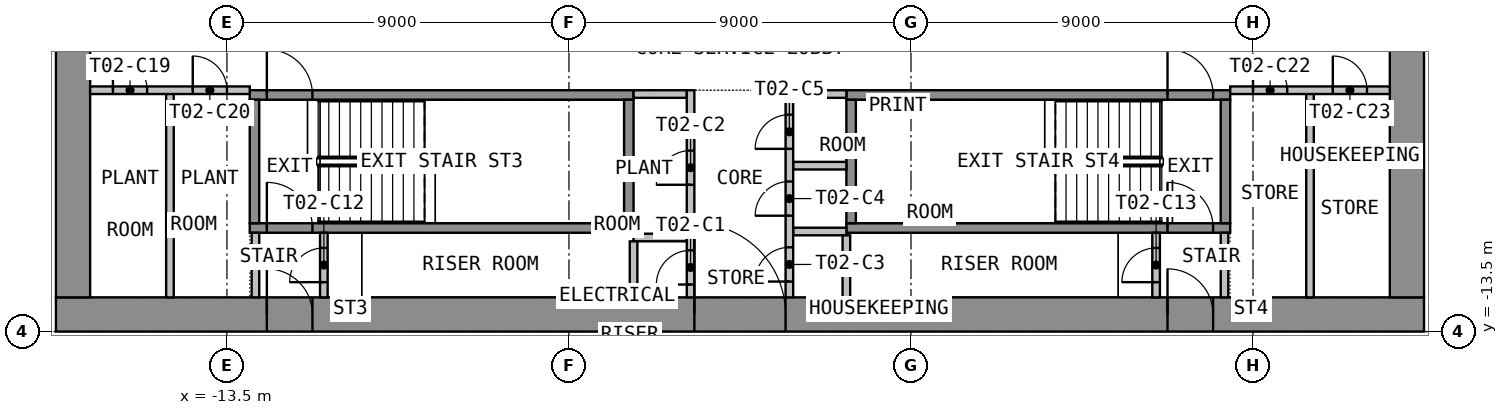
"""IFC4 building model, lengths in metres.
Left out: names, types, materials, properties, quantities, classifications, styles, units other than length and angle.
Written with IfcOpenShell. Run it as: python <this file> out.ifc"""

import sys

from ifc_helpers import new_model, si_unit, direction, frame, frame_2d, origin, place, context, subcontext, project, spatial, rectangle, extrude, element, fill, save


model = new_model("IFC4")
c1 = context("Model", 3, precision=1e-05, world=origin(), true_north=direction((0.0, 1.0)))
c2 = subcontext(c1, "Body", "Model", "MODEL_VIEW")
j1 = project(units=[si_unit("LENGTHUNIT", "METRE"), si_unit("PLANEANGLEUNIT", "RADIAN")], contexts=[c1])
p1 = place(None, origin())
s1 = spatial("IfcSite", under=j1, at=p1, CompositionType="ELEMENT")
p2 = place(p1, origin())
s2 = spatial("IfcBuilding", under=s1, at=p2, CompositionType="ELEMENT")
p3 = place(p2, frame((0.0, 0.0, 41.7)))
s3 = spatial("IfcBuildingStorey", under=s2, at=p3, CompositionType="ELEMENT", Elevation=41.7)
p4 = place(p3, frame((-18.0, -13.05, 0.0), z_axis=(0.0, 0.0, 1.0), x_axis=(1.0, 0.0, 0.0)))
e1 = element("IfcWall", 1, at=p4, inside=s3, PredefinedType="SHEAR", context=c2, shape_type="SweptSolid", body=[
    extrude(rectangle(XDim=36.0, YDim=0.9, at=frame_2d((18.0, 0.0))), origin(), (0.0, 0.0, 1.0), 3.525),
])
p5 = place(p4, frame((16.8, 0.0, 0.0)))
e2 = element("IfcOpeningElement", 2, at=p5, cuts=e1, PredefinedType="OPENING", context=c2, shape_type="SweptSolid", body=[
    extrude(rectangle(XDim=2.4, YDim=2.1, at=frame_2d((1.2, 1.05))), frame((0.0, 0.46, 0.0), z_axis=(0.0, -1.0, 0.0), x_axis=(1.0, 0.0, 0.0)), (0.0, 0.0, 1.0), 0.92),
])
p6 = place(p4, frame((5.55, 0.0, 0.0)))
e3 = element("IfcOpeningElement", 3, at=p6, cuts=e1, PredefinedType="OPENING", context=c2, shape_type="SweptSolid", body=[
    extrude(rectangle(XDim=1.2, YDim=2.1, at=frame_2d((0.6, 1.05))), frame((0.0, 0.46, 0.0), z_axis=(0.0, -1.0, 0.0), x_axis=(1.0, 0.0, 0.0)), (0.0, 0.0, 1.0), 0.92),
])
p7 = place(p4, frame((29.25, 0.0, 0.0)))
e4 = element("IfcOpeningElement", 4, at=p7, cuts=e1, PredefinedType="OPENING", context=c2, shape_type="SweptSolid", body=[
    extrude(rectangle(XDim=1.2, YDim=2.1, at=frame_2d((0.6, 1.05))), frame((0.0, 0.46, 0.0), z_axis=(0.0, -1.0, 0.0), x_axis=(1.0, 0.0, 0.0)), (0.0, 0.0, 1.0), 0.92),
])
p8 = place(p3, frame((-17.55, -12.6, 0.0), z_axis=(0.0, 0.0, 1.0), x_axis=(0.0, 1.0, 0.0)))
e5 = element("IfcWall", 5, at=p8, inside=s3, PredefinedType="SHEAR", context=c2, shape_type="SweptSolid", body=[
    extrude(rectangle(XDim=25.2, YDim=0.9, at=frame_2d((12.6, 0.0))), origin(), (0.0, 0.0, 1.0), 3.525),
])
p9 = place(p8, frame((11.4, 0.0, 0.0)))
e6 = element("IfcOpeningElement", 6, at=p9, cuts=e5, PredefinedType="OPENING", context=c2, shape_type="SweptSolid", body=[
    extrude(rectangle(XDim=2.4, YDim=2.1, at=frame_2d((1.2, 1.05))), frame((0.0, 0.46, 0.0), z_axis=(0.0, -1.0, 0.0), x_axis=(1.0, 0.0, 0.0)), (0.0, 0.0, 1.0), 0.92),
])
p10 = place(p3, frame((17.55, -12.6, 0.0), z_axis=(0.0, 0.0, 1.0), x_axis=(0.0, 1.0, 0.0)))
e7 = element("IfcWall", 7, at=p10, inside=s3, PredefinedType="SHEAR", context=c2, shape_type="SweptSolid", body=[
    extrude(rectangle(XDim=25.2, YDim=0.9, at=frame_2d((12.6, 0.0))), origin(), (0.0, 0.0, 1.0), 3.525),
])
p11 = place(p10, frame((11.4, 0.0, 0.0)))
e8 = element("IfcOpeningElement", 8, at=p11, cuts=e7, PredefinedType="OPENING", context=c2, shape_type="SweptSolid", body=[
    extrude(rectangle(XDim=2.4, YDim=2.1, at=frame_2d((1.2, 1.05))), frame((0.0, 0.46, 0.0), z_axis=(0.0, -1.0, 0.0), x_axis=(1.0, 0.0, 0.0)), (0.0, 0.0, 1.0), 0.92),
])
p12 = place(p3, frame((-12.9, -10.775, 0.0), z_axis=(0.0, 0.0, 1.0), x_axis=(1.0, 0.0, 0.0)))
e9 = element("IfcWall", 9, at=p12, inside=s3, PredefinedType="SHEAR", context=c2, shape_type="SweptSolid", body=[
    extrude(rectangle(XDim=10.1, YDim=0.25, at=frame_2d((5.05, 0.0))), origin(), (0.0, 0.0, 1.0), 3.525),
])
p13 = place(p12, frame((0.45, 0.0, 0.0)))
e10 = element("IfcOpeningElement", 10, at=p13, cuts=e9, PredefinedType="OPENING", context=c2, shape_type="SweptSolid", body=[
    extrude(rectangle(XDim=1.2, YDim=2.1, at=frame_2d((0.6, 1.05))), frame((0.0, 0.135, 0.0), z_axis=(0.0, -1.0, 0.0), x_axis=(1.0, 0.0, 0.0)), (0.0, 0.0, 1.0), 0.27),
])
p14 = place(p3, frame((-12.9, -7.275, 0.0), z_axis=(0.0, 0.0, 1.0), x_axis=(1.0, 0.0, 0.0)))
e11 = element("IfcWall", 11, at=p14, inside=s3, PredefinedType="SHEAR", context=c2, shape_type="SweptSolid", body=[
    extrude(rectangle(XDim=10.1, YDim=0.25, at=frame_2d((5.05, 0.0))), origin(), (0.0, 0.0, 1.0), 3.525),
])
p15 = place(p14, frame((0.45, 0.0, 0.0)))
e12 = element("IfcOpeningElement", 12, at=p15, cuts=e11, PredefinedType="OPENING", context=c2, shape_type="SweptSolid", body=[
    extrude(rectangle(XDim=1.2, YDim=2.1, at=frame_2d((0.6, 1.05))), frame((0.0, 0.135, 0.0), z_axis=(0.0, -1.0, 0.0), x_axis=(1.0, 0.0, 0.0)), (0.0, 0.0, 1.0), 0.27),
])
for number, where, z_axis, x_axis in (
    (13, (-12.775, -10.65, 0.0), (0.0, 0.0, 1.0), (0.0, 1.0, 0.0)),
    (14, (-2.925, -10.65, 0.0), (0.0, 0.0, 1.0), (0.0, 1.0, 0.0)),
):
    element("IfcWall", number, at=place(p3, frame(where, z_axis=z_axis, x_axis=x_axis)), inside=s3, PredefinedType="SHEAR", context=c2, shape_type="SweptSolid", body=[
        extrude(rectangle(XDim=3.25, YDim=0.25, at=frame_2d((1.625, 0.0))), origin(), (0.0, 0.0, 1.0), 3.525),
    ])
p16 = place(p3, frame((2.8, -10.775, 0.0), z_axis=(0.0, 0.0, 1.0), x_axis=(1.0, 0.0, 0.0)))
e15 = element("IfcWall", 15, at=p16, inside=s3, PredefinedType="SHEAR", context=c2, shape_type="SweptSolid", body=[
    extrude(rectangle(XDim=10.1, YDim=0.25, at=frame_2d((5.05, 0.0))), origin(), (0.0, 0.0, 1.0), 3.525),
])
p17 = place(p16, frame((8.45, 0.0, 0.0)))
e16 = element("IfcOpeningElement", 16, at=p17, cuts=e15, PredefinedType="OPENING", context=c2, shape_type="SweptSolid", body=[
    extrude(rectangle(XDim=1.2, YDim=2.1, at=frame_2d((0.6, 1.05))), frame((0.0, 0.135, 0.0), z_axis=(0.0, -1.0, 0.0), x_axis=(1.0, 0.0, 0.0)), (0.0, 0.0, 1.0), 0.27),
])
p18 = place(p3, frame((2.8, -7.275, 0.0), z_axis=(0.0, 0.0, 1.0), x_axis=(1.0, 0.0, 0.0)))
e17 = element("IfcWall", 17, at=p18, inside=s3, PredefinedType="SHEAR", context=c2, shape_type="SweptSolid", body=[
    extrude(rectangle(XDim=10.1, YDim=0.25, at=frame_2d((5.05, 0.0))), origin(), (0.0, 0.0, 1.0), 3.525),
])
p19 = place(p18, frame((8.45, 0.0, 0.0)))
e18 = element("IfcOpeningElement", 18, at=p19, cuts=e17, PredefinedType="OPENING", context=c2, shape_type="SweptSolid", body=[
    extrude(rectangle(XDim=1.2, YDim=2.1, at=frame_2d((0.6, 1.05))), frame((0.0, 0.135, 0.0), z_axis=(0.0, -1.0, 0.0), x_axis=(1.0, 0.0, 0.0)), (0.0, 0.0, 1.0), 0.27),
])
for number, where, z_axis, x_axis in (
    (19, (2.925, -10.65, 0.0), (0.0, 0.0, 1.0), (0.0, 1.0, 0.0)),
    (20, (12.775, -10.65, 0.0), (0.0, 0.0, 1.0), (0.0, 1.0, 0.0)),
):
    element("IfcWall", number, at=place(p3, frame(where, z_axis=z_axis, x_axis=x_axis)), inside=s3, PredefinedType="SHEAR", context=c2, shape_type="SweptSolid", body=[
        extrude(rectangle(XDim=3.25, YDim=0.25, at=frame_2d((1.625, 0.0))), origin(), (0.0, 0.0, 1.0), 3.525),
    ])
for number, where, z_axis, x_axis in (
    (21, (-2.8, -7.25, 0.0), (0.0, 0.0, 1.0), (1.0, 0.0, 0.0)),
    (22, (-2.8, -11.025, 0.0), (0.0, 0.0, 1.0), (1.0, 0.0, 0.0)),
    (23, (1.4, -7.25, 0.0), (0.0, 0.0, 1.0), (1.0, 0.0, 0.0)),
    (24, (1.4, -9.135, 0.0), (0.0, 0.0, 1.0), (1.0, 0.0, 0.0)),
    (25, (1.4, -10.867, 0.0), (0.0, 0.0, 1.0), (1.0, 0.0, 0.0)),
):
    element("IfcWall", number, at=place(p3, frame(where, z_axis=z_axis, x_axis=x_axis)), inside=s3, PredefinedType="PARTITIONING", context=c2, shape_type="SweptSolid", body=[
        extrude(rectangle(XDim=1.4, YDim=0.2, at=frame_2d((0.7, 0.0))), origin(), (0.0, 0.0, 1.0), 3.525),
    ])
p20 = place(p3, frame((-1.3, -12.6, 0.0), z_axis=(0.0, 0.0, 1.0), x_axis=(0.0, 1.0, 0.0)))
e26 = element("IfcWall", 26, at=p20, inside=s3, PredefinedType="PARTITIONING", context=c2, shape_type="SweptSolid", body=[
    extrude(rectangle(XDim=5.45, YDim=0.2, at=frame_2d((2.725, 0.0))), origin(), (0.0, 0.0, 1.0), 3.525),
])
p21 = place(p20, frame((0.337, 0.0, 0.0)))
e27 = element("IfcOpeningElement", 27, at=p21, cuts=e26, PredefinedType="OPENING", context=c2, shape_type="SweptSolid", body=[
    extrude(rectangle(XDim=0.9, YDim=2.1, at=frame_2d((0.45, 1.05))), frame((0.0, 0.11, 0.0), z_axis=(0.0, -1.0, 0.0), x_axis=(1.0, 0.0, 0.0)), (0.0, 0.0, 1.0), 0.22),
])
p22 = place(p20, frame((2.962, 0.0, 0.0)))
e28 = element("IfcOpeningElement", 28, at=p22, cuts=e26, PredefinedType="OPENING", context=c2, shape_type="SweptSolid", body=[
    extrude(rectangle(XDim=0.9, YDim=2.1, at=frame_2d((0.45, 1.05))), frame((0.0, 0.11, 0.0), z_axis=(0.0, -1.0, 0.0), x_axis=(1.0, 0.0, 0.0)), (0.0, 0.0, 1.0), 0.22),
])
p23 = place(p3, frame((1.3, -12.6, 0.0), z_axis=(0.0, 0.0, 1.0), x_axis=(0.0, 1.0, 0.0)))
e29 = element("IfcWall", 29, at=p23, inside=s3, PredefinedType="PARTITIONING", context=c2, shape_type="SweptSolid", body=[
    extrude(rectangle(XDim=5.45, YDim=0.2, at=frame_2d((2.725, 0.0))), origin(), (0.0, 0.0, 1.0), 3.525),
])
p24 = place(p23, frame((0.416, 0.0, 0.0)))
e30 = element("IfcOpeningElement", 30, at=p24, cuts=e29, PredefinedType="OPENING", context=c2, shape_type="SweptSolid", body=[
    extrude(rectangle(XDim=0.9, YDim=2.1, at=frame_2d((0.45, 1.05))), frame((0.0, 0.11, 0.0), z_axis=(0.0, -1.0, 0.0), x_axis=(1.0, 0.0, 0.0)), (0.0, 0.0, 1.0), 0.22),
])
p25 = place(p23, frame((2.149, 0.0, 0.0)))
e31 = element("IfcOpeningElement", 31, at=p25, cuts=e29, PredefinedType="OPENING", context=c2, shape_type="SweptSolid", body=[
    extrude(rectangle(XDim=0.9, YDim=2.1, at=frame_2d((0.45, 1.05))), frame((0.0, 0.11, 0.0), z_axis=(0.0, -1.0, 0.0), x_axis=(1.0, 0.0, 0.0)), (0.0, 0.0, 1.0), 0.22),
])
p26 = place(p23, frame((3.907, 0.0, 0.0)))
e32 = element("IfcOpeningElement", 32, at=p26, cuts=e29, PredefinedType="OPENING", context=c2, shape_type="SweptSolid", body=[
    extrude(rectangle(XDim=0.9, YDim=2.1, at=frame_2d((0.45, 1.05))), frame((0.0, 0.11, 0.0), z_axis=(0.0, -1.0, 0.0), x_axis=(1.0, 0.0, 0.0)), (0.0, 0.0, 1.0), 0.22),
])
p27 = place(p3, frame((-12.75, -12.6, 0.0), z_axis=(0.0, 0.0, 1.0), x_axis=(0.0, 1.0, 0.0)))
e33 = element("IfcWall", 33, at=p27, inside=s3, PredefinedType="PARTITIONING", context=c2, shape_type="SweptSolid", body=[
    extrude(rectangle(XDim=1.7, YDim=0.2, at=frame_2d((0.85, 0.0))), origin(), (0.0, 0.0, 1.0), 3.525),
])
p28 = place(p3, frame((-10.95, -12.6, 0.0), z_axis=(0.0, 0.0, 1.0), x_axis=(0.0, 1.0, 0.0)))
e34 = element("IfcWall", 34, at=p28, inside=s3, PredefinedType="PARTITIONING", context=c2, shape_type="SweptSolid", body=[
    extrude(rectangle(XDim=1.7, YDim=0.2, at=frame_2d((0.85, 0.0))), origin(), (0.0, 0.0, 1.0), 3.525),
])
p29 = place(p28, frame((0.4, 0.0, 0.0)))
e35 = element("IfcOpeningElement", 35, at=p29, cuts=e34, PredefinedType="OPENING", context=c2, shape_type="SweptSolid", body=[
    extrude(rectangle(XDim=0.9, YDim=2.1, at=frame_2d((0.45, 1.05))), frame((0.0, 0.11, 0.0), z_axis=(0.0, -1.0, 0.0), x_axis=(1.0, 0.0, 0.0)), (0.0, 0.0, 1.0), 0.22),
])
p30 = place(p3, frame((12.75, -12.6, 0.0), z_axis=(0.0, 0.0, 1.0), x_axis=(0.0, 1.0, 0.0)))
e36 = element("IfcWall", 36, at=p30, inside=s3, PredefinedType="PARTITIONING", context=c2, shape_type="SweptSolid", body=[
    extrude(rectangle(XDim=1.7, YDim=0.2, at=frame_2d((0.85, 0.0))), origin(), (0.0, 0.0, 1.0), 3.525),
])
p31 = place(p3, frame((10.95, -12.6, 0.0), z_axis=(0.0, 0.0, 1.0), x_axis=(0.0, 1.0, 0.0)))
e37 = element("IfcWall", 37, at=p31, inside=s3, PredefinedType="PARTITIONING", context=c2, shape_type="SweptSolid", body=[
    extrude(rectangle(XDim=1.7, YDim=0.2, at=frame_2d((0.85, 0.0))), origin(), (0.0, 0.0, 1.0), 3.525),
])
p32 = place(p31, frame((0.4, 0.0, 0.0)))
e38 = element("IfcOpeningElement", 38, at=p32, cuts=e37, PredefinedType="OPENING", context=c2, shape_type="SweptSolid", body=[
    extrude(rectangle(XDim=0.9, YDim=2.1, at=frame_2d((0.45, 1.05))), frame((0.0, 0.11, 0.0), z_axis=(0.0, -1.0, 0.0), x_axis=(1.0, 0.0, 0.0)), (0.0, 0.0, 1.0), 0.22),
])
p33 = place(p3, frame((-15.0, -12.6, 0.0), z_axis=(0.0, 0.0, 1.0), x_axis=(0.0, 1.0, 0.0)))
e39 = element("IfcWall", 39, at=p33, inside=s3, PredefinedType="PARTITIONING", context=c2, shape_type="SweptSolid", body=[
    extrude(rectangle(XDim=5.45, YDim=0.2, at=frame_2d((2.725, 0.0))), origin(), (0.0, 0.0, 1.0), 3.525),
])
p34 = place(p3, frame((-17.1, -7.15, 0.0), z_axis=(0.0, 0.0, 1.0), x_axis=(1.0, 0.0, 0.0)))
e40 = element("IfcWall", 40, at=p34, inside=s3, PredefinedType="PARTITIONING", context=c2, shape_type="SweptSolid", body=[
    extrude(rectangle(XDim=4.2, YDim=0.2, at=frame_2d((2.1, 0.0))), origin(), (0.0, 0.0, 1.0), 3.525),
])
p35 = place(p34, frame((0.6, 0.0, 0.0)))
e41 = element("IfcOpeningElement", 41, at=p35, cuts=e40, PredefinedType="OPENING", context=c2, shape_type="SweptSolid", body=[
    extrude(rectangle(XDim=0.9, YDim=2.1, at=frame_2d((0.45, 1.05))), frame((0.0, 0.11, 0.0), z_axis=(0.0, -1.0, 0.0), x_axis=(1.0, 0.0, 0.0)), (0.0, 0.0, 1.0), 0.22),
])
p36 = place(p34, frame((2.7, 0.0, 0.0)))
e42 = element("IfcOpeningElement", 42, at=p36, cuts=e40, PredefinedType="OPENING", context=c2, shape_type="SweptSolid", body=[
    extrude(rectangle(XDim=0.9, YDim=2.1, at=frame_2d((0.45, 1.05))), frame((0.0, 0.11, 0.0), z_axis=(0.0, -1.0, 0.0), x_axis=(1.0, 0.0, 0.0)), (0.0, 0.0, 1.0), 0.22),
])
p37 = place(p3, frame((15.0, -12.6, 0.0), z_axis=(0.0, 0.0, 1.0), x_axis=(0.0, 1.0, 0.0)))
e43 = element("IfcWall", 43, at=p37, inside=s3, PredefinedType="PARTITIONING", context=c2, shape_type="SweptSolid", body=[
    extrude(rectangle(XDim=5.45, YDim=0.2, at=frame_2d((2.725, 0.0))), origin(), (0.0, 0.0, 1.0), 3.525),
])
p38 = place(p3, frame((12.9, -7.15, 0.0), z_axis=(0.0, 0.0, 1.0), x_axis=(1.0, 0.0, 0.0)))
e44 = element("IfcWall", 44, at=p38, inside=s3, PredefinedType="PARTITIONING", context=c2, shape_type="SweptSolid", body=[
    extrude(rectangle(XDim=4.2, YDim=0.2, at=frame_2d((2.1, 0.0))), origin(), (0.0, 0.0, 1.0), 3.525),
])
p39 = place(p38, frame((0.6, 0.0, 0.0)))
e45 = element("IfcOpeningElement", 45, at=p39, cuts=e44, PredefinedType="OPENING", context=c2, shape_type="SweptSolid", body=[
    extrude(rectangle(XDim=0.9, YDim=2.1, at=frame_2d((0.45, 1.05))), frame((0.0, 0.11, 0.0), z_axis=(0.0, -1.0, 0.0), x_axis=(1.0, 0.0, 0.0)), (0.0, 0.0, 1.0), 0.22),
])
p40 = place(p38, frame((2.7, 0.0, 0.0)))
e46 = element("IfcOpeningElement", 46, at=p40, cuts=e44, PredefinedType="OPENING", context=c2, shape_type="SweptSolid", body=[
    extrude(rectangle(XDim=0.9, YDim=2.1, at=frame_2d((0.45, 1.05))), frame((0.0, 0.11, 0.0), z_axis=(0.0, -1.0, 0.0), x_axis=(1.0, 0.0, 0.0)), (0.0, 0.0, 1.0), 0.22),
])
p41 = place(p3, frame((-2.8, -12.599, 0.0), z_axis=(0.0, 0.0, 1.0), x_axis=(0.0, 1.0, 0.0)))
e47 = element("IfcWall", 47, at=p41, inside=s3, PredefinedType="PARTITIONING", context=c2, shape_type="SweptSolid", body=[
    extrude(rectangle(XDim=1.473, YDim=0.2, at=frame_2d((0.737, 0.0))), origin(), (0.0, 0.0, 1.0), 3.525),
])
p42 = place(p3, frame((2.8, -10.969, 0.0), z_axis=(0.0, 0.0, 1.0), x_axis=(0.0, -1.0, 0.0)))
e48 = element("IfcWall", 48, at=p42, inside=s3, PredefinedType="PARTITIONING", context=c2, shape_type="SweptSolid", body=[
    extrude(rectangle(XDim=1.631, YDim=0.2, at=frame_2d((0.815, 0.0))), origin(), (0.0, 0.0, 1.0), 3.525),
])
p43 = place(p5, origin())
e49 = element("IfcDoor", 49, at=p43, inside=s3, OperationType="DOUBLE_DOOR_DOUBLE_SWING", PredefinedType="DOOR", context=c2, shape_type="SweptSolid", body=[
    extrude(rectangle(XDim=2.4, YDim=2.1, at=frame_2d((1.2, 1.05))), frame((0.0, 0.025, 0.0), z_axis=(0.0, -1.0, 0.0), x_axis=(1.0, 0.0, 0.0)), (0.0, 0.0, 1.0), 0.05),
])
fill(e2, e49)
p44 = place(p6, origin())
e50 = element("IfcDoor", 50, at=p44, inside=s3, OperationType="SINGLE_SWING_RIGHT", PredefinedType="DOOR", context=c2, shape_type="SweptSolid", body=[
    extrude(rectangle(XDim=1.2, YDim=2.1, at=frame_2d((0.6, 1.05))), frame((0.0, 0.025, 0.0), z_axis=(0.0, -1.0, 0.0), x_axis=(1.0, 0.0, 0.0)), (0.0, 0.0, 1.0), 0.05),
])
fill(e3, e50)
p45 = place(p7, origin())
e51 = element("IfcDoor", 51, at=p45, inside=s3, OperationType="SINGLE_SWING_RIGHT", PredefinedType="DOOR", context=c2, shape_type="SweptSolid", body=[
    extrude(rectangle(XDim=1.2, YDim=2.1, at=frame_2d((0.6, 1.05))), frame((0.0, 0.025, 0.0), z_axis=(0.0, -1.0, 0.0), x_axis=(1.0, 0.0, 0.0)), (0.0, 0.0, 1.0), 0.05),
])
fill(e4, e51)
p46 = place(p15, origin())
e52 = element("IfcDoor", 52, at=p46, inside=s3, OperationType="SINGLE_SWING_LEFT", PredefinedType="DOOR", context=c2, shape_type="SweptSolid", body=[
    extrude(rectangle(XDim=1.2, YDim=2.1, at=frame_2d((0.6, 1.05))), frame((0.0, 0.025, 0.0), z_axis=(0.0, -1.0, 0.0), x_axis=(1.0, 0.0, 0.0)), (0.0, 0.0, 1.0), 0.05),
])
fill(e12, e52)
p47 = place(p19, origin())
e53 = element("IfcDoor", 53, at=p47, inside=s3, OperationType="SINGLE_SWING_LEFT", PredefinedType="DOOR", context=c2, shape_type="SweptSolid", body=[
    extrude(rectangle(XDim=1.2, YDim=2.1, at=frame_2d((0.6, 1.05))), frame((0.0, 0.025, 0.0), z_axis=(0.0, -1.0, 0.0), x_axis=(1.0, 0.0, 0.0)), (0.0, 0.0, 1.0), 0.05),
])
fill(e18, e53)
p48 = place(p21, origin())
e54 = element("IfcDoor", 54, at=p48, inside=s3, OperationType="SINGLE_SWING_LEFT", PredefinedType="DOOR", context=c2, shape_type="SweptSolid", body=[
    extrude(rectangle(XDim=0.9, YDim=2.1, at=frame_2d((0.45, 1.05))), frame((0.0, 0.025, 0.0), z_axis=(0.0, -1.0, 0.0), x_axis=(1.0, 0.0, 0.0)), (0.0, 0.0, 1.0), 0.05),
])
fill(e27, e54)
p49 = place(p22, origin())
e55 = element("IfcDoor", 55, at=p49, inside=s3, OperationType="SINGLE_SWING_LEFT", PredefinedType="DOOR", context=c2, shape_type="SweptSolid", body=[
    extrude(rectangle(XDim=0.9, YDim=2.1, at=frame_2d((0.45, 1.05))), frame((0.0, 0.025, 0.0), z_axis=(0.0, -1.0, 0.0), x_axis=(1.0, 0.0, 0.0)), (0.0, 0.0, 1.0), 0.05),
])
fill(e28, e55)
p50 = place(p24, origin())
e56 = element("IfcDoor", 56, at=p50, inside=s3, OperationType="SINGLE_SWING_LEFT", PredefinedType="DOOR", context=c2, shape_type="SweptSolid", body=[
    extrude(rectangle(XDim=0.9, YDim=2.1, at=frame_2d((0.45, 1.05))), frame((0.0, 0.025, 0.0), z_axis=(0.0, -1.0, 0.0), x_axis=(1.0, 0.0, 0.0)), (0.0, 0.0, 1.0), 0.05),
])
fill(e30, e56)
p51 = place(p25, origin())
e57 = element("IfcDoor", 57, at=p51, inside=s3, OperationType="SINGLE_SWING_LEFT", PredefinedType="DOOR", context=c2, shape_type="SweptSolid", body=[
    extrude(rectangle(XDim=0.9, YDim=2.1, at=frame_2d((0.45, 1.05))), frame((0.0, 0.025, 0.0), z_axis=(0.0, -1.0, 0.0), x_axis=(1.0, 0.0, 0.0)), (0.0, 0.0, 1.0), 0.05),
])
fill(e31, e57)
p52 = place(p26, origin())
e58 = element("IfcDoor", 58, at=p52, inside=s3, OperationType="SINGLE_SWING_LEFT", PredefinedType="DOOR", context=c2, shape_type="SweptSolid", body=[
    extrude(rectangle(XDim=0.9, YDim=2.1, at=frame_2d((0.45, 1.05))), frame((0.0, 0.025, 0.0), z_axis=(0.0, -1.0, 0.0), x_axis=(1.0, 0.0, 0.0)), (0.0, 0.0, 1.0), 0.05),
])
fill(e32, e58)
p53 = place(p13, origin())
e59 = element("IfcDoor", 59, at=p53, inside=s3, OperationType="SINGLE_SWING_RIGHT", PredefinedType="DOOR", context=c2, shape_type="SweptSolid", body=[
    extrude(rectangle(XDim=1.2, YDim=2.1, at=frame_2d((0.6, 1.05))), frame((0.0, 0.025, 0.0), z_axis=(0.0, -1.0, 0.0), x_axis=(1.0, 0.0, 0.0)), (0.0, 0.0, 1.0), 0.05),
])
fill(e10, e59)
p54 = place(p29, origin())
e60 = element("IfcDoor", 60, at=p54, inside=s3, OperationType="SINGLE_SWING_LEFT", PredefinedType="DOOR", context=c2, shape_type="SweptSolid", body=[
    extrude(rectangle(XDim=0.9, YDim=2.1, at=frame_2d((0.45, 1.05))), frame((0.0, 0.025, 0.0), z_axis=(0.0, -1.0, 0.0), x_axis=(1.0, 0.0, 0.0)), (0.0, 0.0, 1.0), 0.05),
])
fill(e35, e60)
p55 = place(p17, origin())
e61 = element("IfcDoor", 61, at=p55, inside=s3, OperationType="SINGLE_SWING_RIGHT", PredefinedType="DOOR", context=c2, shape_type="SweptSolid", body=[
    extrude(rectangle(XDim=1.2, YDim=2.1, at=frame_2d((0.6, 1.05))), frame((0.0, 0.025, 0.0), z_axis=(0.0, -1.0, 0.0), x_axis=(1.0, 0.0, 0.0)), (0.0, 0.0, 1.0), 0.05),
])
fill(e16, e61)
p56 = place(p32, origin())
e62 = element("IfcDoor", 62, at=p56, inside=s3, OperationType="SINGLE_SWING_LEFT", PredefinedType="DOOR", context=c2, shape_type="SweptSolid", body=[
    extrude(rectangle(XDim=0.9, YDim=2.1, at=frame_2d((0.45, 1.05))), frame((0.0, 0.025, 0.0), z_axis=(0.0, -1.0, 0.0), x_axis=(1.0, 0.0, 0.0)), (0.0, 0.0, 1.0), 0.05),
])
fill(e38, e62)
p57 = place(p35, origin())
e63 = element("IfcDoor", 63, at=p57, inside=s3, OperationType="SINGLE_SWING_LEFT", PredefinedType="DOOR", context=c2, shape_type="SweptSolid", body=[
    extrude(rectangle(XDim=0.9, YDim=2.1, at=frame_2d((0.45, 1.05))), frame((0.0, 0.025, 0.0), z_axis=(0.0, -1.0, 0.0), x_axis=(1.0, 0.0, 0.0)), (0.0, 0.0, 1.0), 0.05),
])
fill(e41, e63)
p58 = place(p36, origin())
e64 = element("IfcDoor", 64, at=p58, inside=s3, OperationType="SINGLE_SWING_LEFT", PredefinedType="DOOR", context=c2, shape_type="SweptSolid", body=[
    extrude(rectangle(XDim=0.9, YDim=2.1, at=frame_2d((0.45, 1.05))), frame((0.0, 0.025, 0.0), z_axis=(0.0, -1.0, 0.0), x_axis=(1.0, 0.0, 0.0)), (0.0, 0.0, 1.0), 0.05),
])
fill(e42, e64)
p59 = place(p39, origin())
e65 = element("IfcDoor", 65, at=p59, inside=s3, OperationType="SINGLE_SWING_LEFT", PredefinedType="DOOR", context=c2, shape_type="SweptSolid", body=[
    extrude(rectangle(XDim=0.9, YDim=2.1, at=frame_2d((0.45, 1.05))), frame((0.0, 0.025, 0.0), z_axis=(0.0, -1.0, 0.0), x_axis=(1.0, 0.0, 0.0)), (0.0, 0.0, 1.0), 0.05),
])
fill(e45, e65)
p60 = place(p40, origin())
e66 = element("IfcDoor", 66, at=p60, inside=s3, OperationType="SINGLE_SWING_LEFT", PredefinedType="DOOR", context=c2, shape_type="SweptSolid", body=[
    extrude(rectangle(XDim=0.9, YDim=2.1, at=frame_2d((0.45, 1.05))), frame((0.0, 0.025, 0.0), z_axis=(0.0, -1.0, 0.0), x_axis=(1.0, 0.0, 0.0)), (0.0, 0.0, 1.0), 0.05),
])
fill(e46, e66)
save(model, sys.argv[1])
